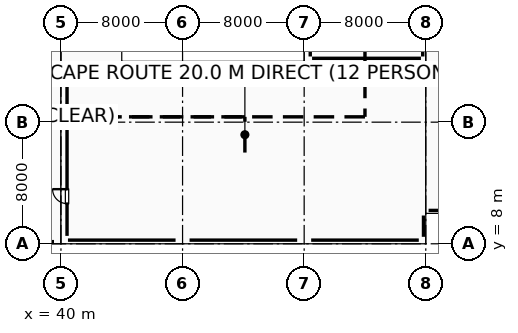
"""IFC4 building model, lengths in metres.
Left out: names, types, materials, properties, quantities, classifications, styles, units other than length and angle.
Written with IfcOpenShell. Run it as: python <this file> out.ifc"""

import sys

from ifc_helpers import new_model, si_unit, direction, frame, frame_2d, origin, origin_2d, place, context, subcontext, project, spatial, rectangle, circle, extrude, element, fill, save


model = new_model("IFC4")
c1 = context("Model", 3, precision=1e-05, world=origin(), true_north=direction((0.0, 1.0)))
c2 = subcontext(c1, "Body", "Model", "MODEL_VIEW")
j1 = project(units=[si_unit("LENGTHUNIT", "METRE"), si_unit("PLANEANGLEUNIT", "RADIAN")], contexts=[c1])
p1 = place(None, origin())
s1 = spatial("IfcSite", under=j1, at=p1, CompositionType="ELEMENT")
p2 = place(p1, origin())
s2 = spatial("IfcBuilding", under=s1, at=p2, CompositionType="ELEMENT")
p3 = place(p2, frame((0.0, 0.0, 5.4)))
s3 = spatial("IfcBuildingStorey", under=s2, at=p3, CompositionType="ELEMENT", Elevation=5.4)
for number, where, z_axis, x_axis in (
    (1, (40.0, 8.0, 0.0), (0.0, 0.0, 1.0), (1.0, 0.0, 0.0)),
    (2, (40.0, 16.0, 0.0), (0.0, 0.0, 1.0), (1.0, 0.0, 0.0)),
):
    element("IfcColumn", number, at=place(p3, frame(where, z_axis=z_axis, x_axis=x_axis)), inside=s3, PredefinedType="COLUMN", context=c2, shape_type="SweptSolid", body=[
        extrude(rectangle(XDim=0.9, YDim=0.9, at=origin_2d()), origin(), (0.0, 0.0, 1.0), 4.8),
    ])
p4 = place(p3, frame((48.0, 8.0, 0.0), z_axis=(0.0, 0.0, 1.0), x_axis=(1.0, 0.0, 0.0)))
e3 = element("IfcColumn", 3, at=p4, inside=s3, PredefinedType="COLUMN", context=c2, shape_type="SweptSolid", body=[
    extrude(circle(Radius=0.45, at=origin_2d()), origin(), (0.0, 0.0, 1.0), 4.8),
])
p5 = place(p3, frame((48.0, 16.0, 0.0), z_axis=(0.0, 0.0, 1.0), x_axis=(1.0, 0.0, 0.0)))
e4 = element("IfcColumn", 4, at=p5, inside=s3, PredefinedType="COLUMN", context=c2, shape_type="SweptSolid", body=[
    extrude(rectangle(XDim=0.75, YDim=0.75, at=origin_2d()), origin(), (0.0, 0.0, 1.0), 4.8),
])
p6 = place(p3, frame((56.0, 8.0, 0.0), z_axis=(0.0, 0.0, 1.0), x_axis=(1.0, 0.0, 0.0)))
e5 = element("IfcColumn", 5, at=p6, inside=s3, PredefinedType="COLUMN", context=c2, shape_type="SweptSolid", body=[
    extrude(circle(Radius=0.45, at=origin_2d()), origin(), (0.0, 0.0, 1.0), 4.8),
])
p7 = place(p3, frame((56.0, 16.0, 0.0), z_axis=(0.0, 0.0, 1.0), x_axis=(1.0, 0.0, 0.0)))
e6 = element("IfcColumn", 6, at=p7, inside=s3, PredefinedType="COLUMN", context=c2, shape_type="SweptSolid", body=[
    extrude(rectangle(XDim=0.75, YDim=0.75, at=origin_2d()), origin(), (0.0, 0.0, 1.0), 4.8),
])
p8 = place(p3, frame((64.0, 8.0, 0.0), z_axis=(0.0, 0.0, 1.0), x_axis=(1.0, 0.0, 0.0)))
e7 = element("IfcColumn", 7, at=p8, inside=s3, PredefinedType="COLUMN", context=c2, shape_type="SweptSolid", body=[
    extrude(rectangle(XDim=0.9, YDim=0.9, at=origin_2d()), origin(), (0.0, 0.0, 1.0), 4.8),
])
p9 = place(p3, frame((118.415, 10.195, 0.0), z_axis=(0.0, 0.0, 1.0), x_axis=(-1.0, 0.0, 0.0)))
e8 = element("IfcWall", 8, at=p9, inside=s3, PredefinedType="STANDARD", context=c2, shape_type="SweptSolid", body=[
    extrude(rectangle(XDim=54.23, YDim=0.35, at=frame_2d((27.115, 0.0))), origin(), (0.0, 0.0, 1.0), 3.725),
])
p10 = place(p3, frame((63.85, 9.86, 0.0), z_axis=(0.0, 0.0, 1.0), x_axis=(0.0, -1.0, 0.0)))
e9 = element("IfcWall", 9, at=p10, inside=s3, PredefinedType="ELEMENTEDWALL", context=c2, shape_type="SweptSolid", body=[
    extrude(rectangle(XDim=1.402, YDim=0.26, at=frame_2d((0.701, 0.0))), origin(), (0.0, 0.0, 1.0), 4.54),
])
for number, where, z_axis, x_axis in (
    (10, (63.54, 8.24, 0.0), (0.0, 0.0, 1.0), (-1.0, 0.0, 0.0)),
    (11, (55.54, 8.24, 0.0), (0.0, 0.0, 1.0), (-1.0, 0.0, 0.0)),
    (12, (47.54, 8.24, 0.0), (0.0, 0.0, 1.0), (-1.0, 0.0, 0.0)),
):
    element("IfcWall", number, at=place(p3, frame(where, z_axis=z_axis, x_axis=x_axis)), inside=s3, PredefinedType="PARAPET", context=c2, shape_type="SweptSolid", body=[
        extrude(rectangle(XDim=7.08, YDim=0.18, at=frame_2d((3.54, 0.0))), origin(), (0.0, 0.0, 1.0), 0.88),
    ])
p11 = place(p3, frame((39.542, 8.14, 0.0), z_axis=(0.0, 0.0, 1.0), x_axis=(-1.0, 0.0, 0.0)))
e13 = element("IfcWall", 13, at=p11, inside=s3, PredefinedType="ELEMENTEDWALL", context=c2, shape_type="SweptSolid", body=[
    extrude(rectangle(XDim=3.37, YDim=0.24, at=frame_2d((1.685, 0.0))), origin(), (0.0, 0.0, 1.0), 3.925),
])
p12 = place(p3, frame((40.52, 19.6, 0.0), z_axis=(0.0, 0.0, 1.0), x_axis=(1.0, 0.0, 0.0)))
e14 = element("IfcWall", 14, at=p12, inside=s3, PredefinedType="PARTITIONING", context=c2, shape_type="SweptSolid", body=[
    extrude(rectangle(XDim=23.16, YDim=0.2, at=frame_2d((11.58, 0.0))), origin(), (0.0, 0.0, 1.0), 4.53),
])
p13 = place(p3, frame((40.4, 8.52, 0.0), z_axis=(0.0, 0.0, 1.0), x_axis=(0.0, 1.0, 0.0)))
e15 = element("IfcWall", 15, at=p13, inside=s3, PredefinedType="PARTITIONING", context=c2, shape_type="SweptSolid", body=[
    extrude(rectangle(XDim=7.015, YDim=0.2, at=frame_2d((3.507, 0.0))), origin(), (0.0, 0.0, 1.0), 3.77),
])
p14 = place(p13, frame((2.123, 0.0, 0.0)))
e16 = element("IfcOpeningElement", 16, at=p14, cuts=e15, PredefinedType="OPENING", context=c2, shape_type="SweptSolid", body=[
    extrude(rectangle(XDim=0.95, YDim=2.15, at=frame_2d((0.475, 1.075))), frame((0.0, 0.11, 0.0), z_axis=(0.0, -1.0, 0.0), x_axis=(1.0, 0.0, 0.0)), (0.0, 0.0, 1.0), 0.22),
])
p15 = place(p3, frame((40.4, 16.465, 0.0), z_axis=(0.0, 0.0, 1.0), x_axis=(0.0, 1.0, 0.0)))
e17 = element("IfcWall", 17, at=p15, inside=s3, PredefinedType="PARTITIONING", context=c2, shape_type="SweptSolid", body=[
    extrude(rectangle(XDim=3.015, YDim=0.2, at=frame_2d((1.507, 0.0))), origin(), (0.0, 0.0, 1.0), 4.53),
])
p16 = place(p3, frame((63.8, 40.08, 0.0), z_axis=(0.0, 0.0, 1.0), x_axis=(0.0, -1.0, 0.0)))
e18 = element("IfcWall", 18, at=p16, inside=s3, PredefinedType="PARTITIONING", context=c2, shape_type="SweptSolid", body=[
    extrude(rectangle(XDim=19.76, YDim=0.2, at=frame_2d((9.88, 0.0))), origin(), (0.0, 0.0, 1.0), 3.72),
])
p17 = place(p16, frame((9.355, 0.0, 0.0)))
e19 = element("IfcOpeningElement", 19, at=p17, cuts=e18, PredefinedType="OPENING", context=c2, shape_type="SweptSolid", body=[
    extrude(rectangle(XDim=1.05, YDim=2.15, at=frame_2d((0.525, 1.075))), frame((0.0, 0.11, 0.0), z_axis=(0.0, -1.0, 0.0), x_axis=(1.0, 0.0, 0.0)), (0.0, 0.0, 1.0), 0.22),
])
p18 = place(p3, frame((63.68, 20.2, 0.0), z_axis=(0.0, 0.0, 1.0), x_axis=(-1.0, 0.0, 0.0)))
e20 = element("IfcWall", 20, at=p18, inside=s3, PredefinedType="PARTITIONING", context=c2, shape_type="SweptSolid", body=[
    extrude(rectangle(XDim=7.16, YDim=0.2, at=frame_2d((3.58, 0.0))), origin(), (0.0, 0.0, 1.0), 4.53),
])
p19 = place(p3, frame((56.4, 20.32, 0.0), z_axis=(0.0, 0.0, 1.0), x_axis=(0.0, 1.0, 0.0)))
e21 = element("IfcWall", 21, at=p19, inside=s3, PredefinedType="PARTITIONING", context=c2, shape_type="SweptSolid", body=[
    extrude(rectangle(XDim=3.29, YDim=0.2, at=frame_2d((1.645, 0.0))), origin(), (0.0, 0.0, 1.0), 4.53),
])
p20 = place(p14, origin())
e22 = element("IfcDoor", 22, at=p20, inside=s3, OperationType="SINGLE_SWING_RIGHT", PredefinedType="DOOR", context=c2, shape_type="SweptSolid", body=[
    extrude(rectangle(XDim=0.95, YDim=2.15, at=frame_2d((0.475, 1.075))), frame((0.0, 0.025, 0.0), z_axis=(0.0, -1.0, 0.0), x_axis=(1.0, 0.0, 0.0)), (0.0, 0.0, 1.0), 0.05),
])
fill(e16, e22)
save(model, sys.argv[1])
